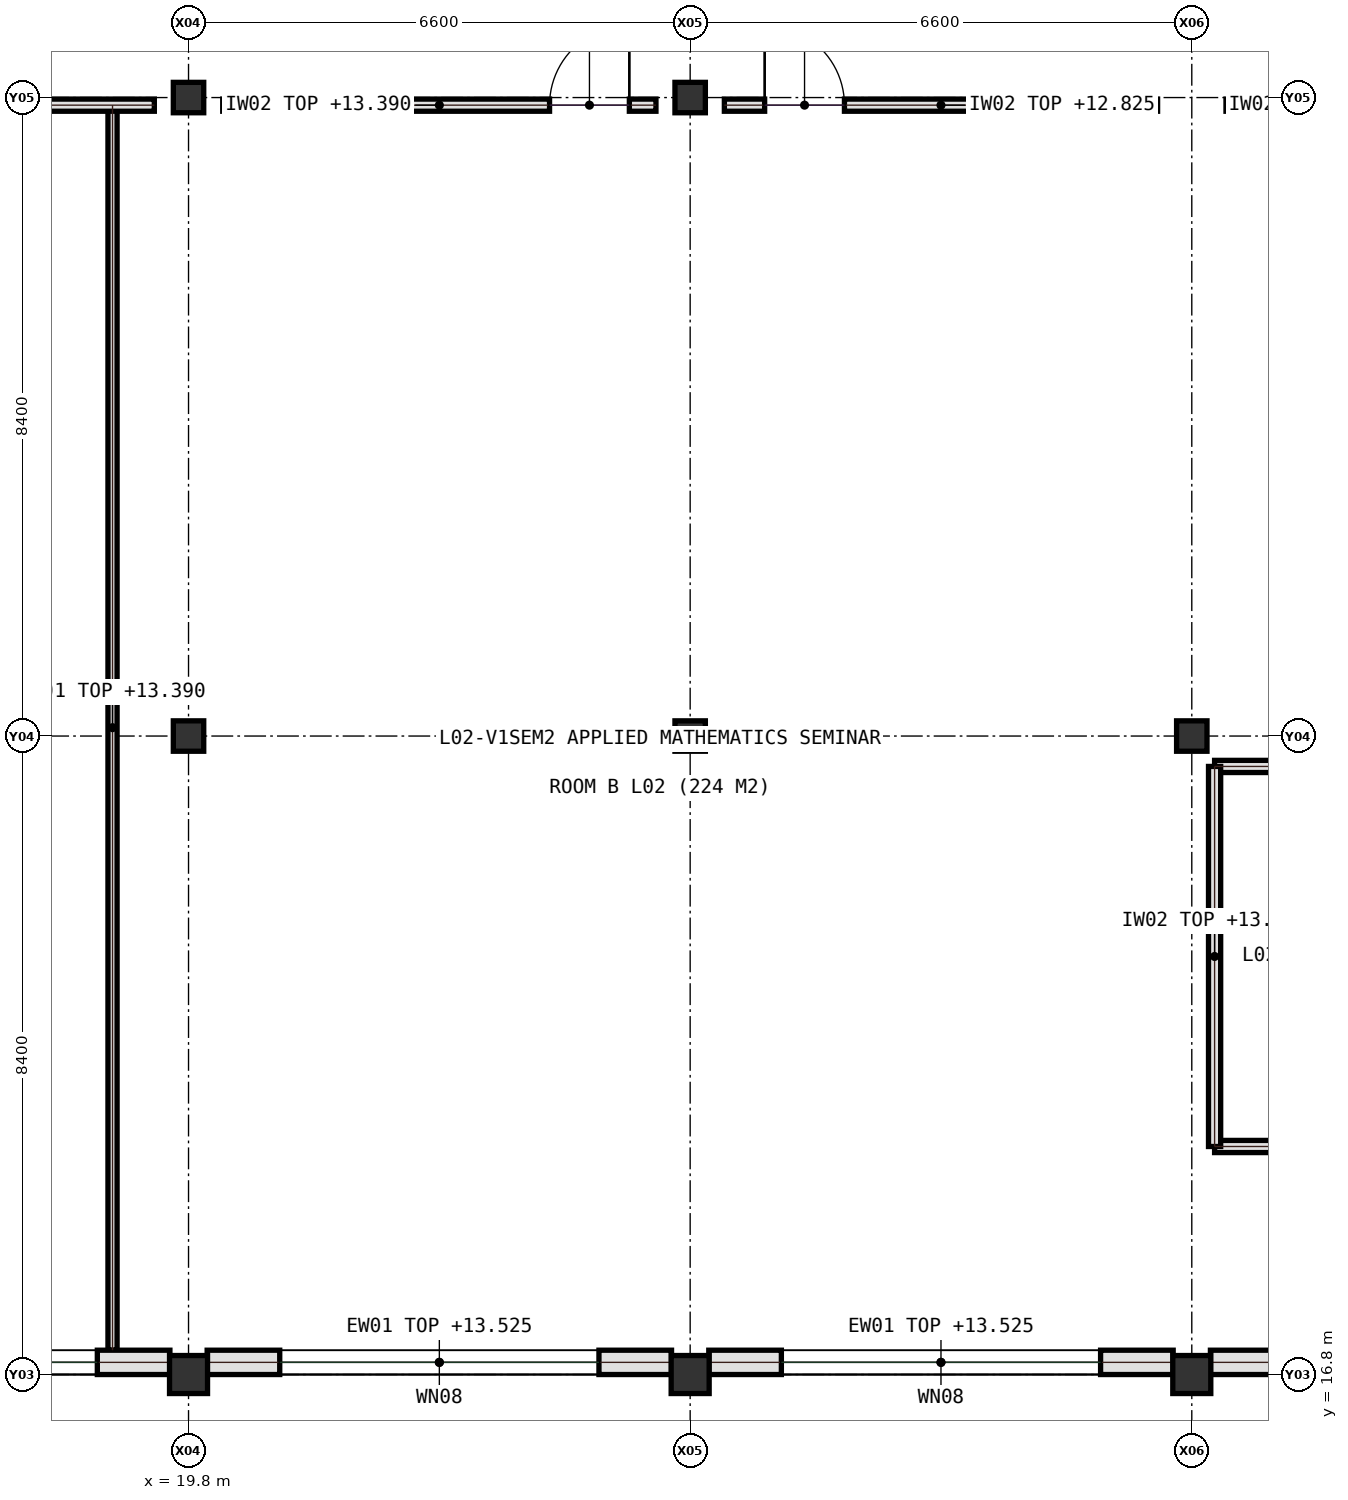
"""IFC4 building model, lengths in metres.
Left out: names, types, materials, properties, quantities, classifications, styles, units other than length and angle.
Written with IfcOpenShell. Run it as: python <this file> out.ifc"""

import sys

from ifc_helpers import new_model, si_unit, direction, frame, frame_2d, origin, origin_2d, place, context, subcontext, project, spatial, rectangle, extrude, element, fill, save


model = new_model("IFC4")
c1 = context("Model", 3, precision=1e-05, world=origin(), true_north=direction((0.0, 1.0)))
c2 = subcontext(c1, "Body", "Model", "MODEL_VIEW")
j1 = project(units=[si_unit("LENGTHUNIT", "METRE"), si_unit("PLANEANGLEUNIT", "RADIAN")], contexts=[c1])
p1 = place(None, origin())
s1 = spatial("IfcSite", under=j1, at=p1, CompositionType="ELEMENT")
p2 = place(p1, origin())
s2 = spatial("IfcBuilding", under=s1, at=p2, CompositionType="ELEMENT")
p3 = place(p2, frame((0.0, 0.0, 9.9)))
s3 = spatial("IfcBuildingStorey", under=s2, at=p3, CompositionType="ELEMENT", Elevation=9.9)
p4 = place(p3, frame((19.8, 16.8, 0.0), z_axis=(0.0, 0.0, 1.0), x_axis=(1.0, 0.0, 0.0)))
e1 = element("IfcColumn", 1, at=p4, inside=s3, PredefinedType="COLUMN", context=c2, shape_type="SweptSolid", body=[
    extrude(rectangle(XDim=0.5, YDim=0.5, at=origin_2d()), origin(), (0.0, 0.0, 1.0), 4.5),
])
for number, where, z_axis, x_axis in (
    (2, (19.8, 25.2, 0.0), (0.0, 0.0, 1.0), (1.0, 0.0, 0.0)),
    (3, (19.8, 33.6, 0.0), (0.0, 0.0, 1.0), (1.0, 0.0, 0.0)),
):
    element("IfcColumn", number, at=place(p3, frame(where, z_axis=z_axis, x_axis=x_axis)), inside=s3, PredefinedType="COLUMN", context=c2, shape_type="SweptSolid", body=[
        extrude(rectangle(XDim=0.4, YDim=0.4, at=origin_2d()), origin(), (0.0, 0.0, 1.0), 4.5),
    ])
p5 = place(p3, frame((26.4, 16.8, 0.0), z_axis=(0.0, 0.0, 1.0), x_axis=(1.0, 0.0, 0.0)))
e4 = element("IfcColumn", 4, at=p5, inside=s3, PredefinedType="COLUMN", context=c2, shape_type="SweptSolid", body=[
    extrude(rectangle(XDim=0.5, YDim=0.5, at=origin_2d()), origin(), (0.0, 0.0, 1.0), 4.5),
])
for number, where, z_axis, x_axis in (
    (5, (26.4, 25.2, 0.0), (0.0, 0.0, 1.0), (1.0, 0.0, 0.0)),
    (6, (26.4, 33.6, 0.0), (0.0, 0.0, 1.0), (1.0, 0.0, 0.0)),
):
    element("IfcColumn", number, at=place(p3, frame(where, z_axis=z_axis, x_axis=x_axis)), inside=s3, PredefinedType="COLUMN", context=c2, shape_type="SweptSolid", body=[
        extrude(rectangle(XDim=0.4, YDim=0.4, at=origin_2d()), origin(), (0.0, 0.0, 1.0), 4.5),
    ])
p6 = place(p3, frame((33.0, 16.8, 0.0), z_axis=(0.0, 0.0, 1.0), x_axis=(1.0, 0.0, 0.0)))
e7 = element("IfcColumn", 7, at=p6, inside=s3, PredefinedType="COLUMN", context=c2, shape_type="SweptSolid", body=[
    extrude(rectangle(XDim=0.5, YDim=0.5, at=origin_2d()), origin(), (0.0, 0.0, 1.0), 4.5),
])
p7 = place(p3, frame((33.0, 25.2, 0.0), z_axis=(0.0, 0.0, 1.0), x_axis=(1.0, 0.0, 0.0)))
e8 = element("IfcColumn", 8, at=p7, inside=s3, PredefinedType="COLUMN", context=c2, shape_type="SweptSolid", body=[
    extrude(rectangle(XDim=0.4, YDim=0.4, at=origin_2d()), origin(), (0.0, 0.0, 1.0), 4.5),
])
p8 = place(p3, frame((33.3, 19.8, 0.0), z_axis=(0.0, 0.0, 1.0), x_axis=(1.0, 0.0, 0.0)))
e9 = element("IfcWall", 9, at=p8, inside=s3, PredefinedType="PARTITIONING", context=c2, shape_type="SweptSolid", body=[
    extrude(rectangle(XDim=12.65, YDim=0.16, at=frame_2d((6.325, 0.0))), origin(), (0.0, 0.0, 1.0), 3.49),
])
p9 = place(p8, frame((2.2, 0.0, 0.0)))
e10 = element("IfcOpeningElement", 10, at=p9, cuts=e9, PredefinedType="OPENING", context=c2, shape_type="SweptSolid", body=[
    extrude(rectangle(XDim=1.05, YDim=2.15, at=frame_2d((0.525, 1.075))), frame((0.0, 0.09, 0.0), z_axis=(0.0, -1.0, 0.0), x_axis=(1.0, 0.0, 0.0)), (0.0, 0.0, 1.0), 0.18),
])
p10 = place(p8, frame((7.0, 0.0, 0.0)))
e11 = element("IfcOpeningElement", 11, at=p10, cuts=e9, PredefinedType="OPENING", context=c2, shape_type="SweptSolid", body=[
    extrude(rectangle(XDim=1.05, YDim=2.15, at=frame_2d((0.525, 1.075))), frame((0.0, 0.09, 0.0), z_axis=(0.0, -1.0, 0.0), x_axis=(1.0, 0.0, 0.0)), (0.0, 0.0, 1.0), 0.18),
])
p11 = place(p8, frame((11.1, 0.0, 0.0)))
e12 = element("IfcOpeningElement", 12, at=p11, cuts=e9, PredefinedType="OPENING", context=c2, shape_type="SweptSolid", body=[
    extrude(rectangle(XDim=1.05, YDim=2.15, at=frame_2d((0.525, 1.075))), frame((0.0, 0.09, 0.0), z_axis=(0.0, -1.0, 0.0), x_axis=(1.0, 0.0, 0.0)), (0.0, 0.0, 1.0), 0.18),
])
p12 = place(p3, frame((33.3, 24.8, 0.0), z_axis=(0.0, 0.0, 1.0), x_axis=(1.0, 0.0, 0.0)))
e13 = element("IfcWall", 13, at=p12, inside=s3, PredefinedType="PARTITIONING", context=c2, shape_type="SweptSolid", body=[
    extrude(rectangle(XDim=5.85, YDim=0.16, at=frame_2d((2.925, 0.0))), origin(), (0.0, 0.0, 1.0), 3.49),
])
p13 = place(p3, frame((33.3, 19.8, 0.0), z_axis=(0.0, 0.0, 1.0), x_axis=(0.0, 1.0, 0.0)))
e14 = element("IfcWall", 14, at=p13, inside=s3, PredefinedType="PARTITIONING", context=c2, shape_type="SweptSolid", body=[
    extrude(rectangle(XDim=5.0, YDim=0.16, at=frame_2d((2.5, 0.0))), origin(), (0.0, 0.0, 1.0), 3.49),
])
p14 = place(p3, frame((18.8, 17.12, 0.0), z_axis=(0.0, 0.0, 1.0), x_axis=(0.0, 1.0, 0.0)))
e15 = element("IfcWall", 15, at=p14, inside=s3, PredefinedType="PARTITIONING", context=c2, shape_type="SweptSolid", body=[
    extrude(rectangle(XDim=16.38, YDim=0.12, at=frame_2d((8.19, 0.0))), origin(), (0.0, 0.0, 1.0), 3.49),
])
p15 = place(p3, frame((13.65, 33.5, 0.0), z_axis=(0.0, 0.0, 1.0), x_axis=(1.0, 0.0, 0.0)))
e16 = element("IfcWall", 16, at=p15, inside=s3, PredefinedType="PARTITIONING", context=c2, shape_type="SweptSolid", body=[
    extrude(rectangle(XDim=5.7, YDim=0.16, at=frame_2d((2.85, 0.0))), origin(), (0.0, 0.0, 1.0), 2.925),
])
p16 = place(p3, frame((20.25, 33.5, 0.0), z_axis=(0.0, 0.0, 1.0), x_axis=(1.0, 0.0, 0.0)))
e17 = element("IfcWall", 17, at=p16, inside=s3, PredefinedType="PARTITIONING", context=c2, shape_type="SweptSolid", body=[
    extrude(rectangle(XDim=5.7, YDim=0.16, at=frame_2d((2.85, 0.0))), origin(), (0.0, 0.0, 1.0), 3.49),
])
p17 = place(p16, frame((4.3, 0.0, 0.0)))
e18 = element("IfcOpeningElement", 18, at=p17, cuts=e17, PredefinedType="OPENING", context=c2, shape_type="SweptSolid", body=[
    extrude(rectangle(XDim=1.05, YDim=2.15, at=frame_2d((0.525, 1.075))), frame((0.0, 0.09, 0.0), z_axis=(0.0, -1.0, 0.0), x_axis=(1.0, 0.0, 0.0)), (0.0, 0.0, 1.0), 0.18),
])
p18 = place(p3, frame((26.85, 33.5, 0.0), z_axis=(0.0, 0.0, 1.0), x_axis=(1.0, 0.0, 0.0)))
e19 = element("IfcWall", 19, at=p18, inside=s3, PredefinedType="PARTITIONING", context=c2, shape_type="SweptSolid", body=[
    extrude(rectangle(XDim=5.7, YDim=0.16, at=frame_2d((2.85, 0.0))), origin(), (0.0, 0.0, 1.0), 2.925),
])
p19 = place(p18, frame((0.53, 0.0, 0.0)))
e20 = element("IfcOpeningElement", 20, at=p19, cuts=e19, PredefinedType="OPENING", context=c2, shape_type="SweptSolid", body=[
    extrude(rectangle(XDim=1.05, YDim=2.15, at=frame_2d((0.525, 1.075))), frame((0.0, 0.09, 0.0), z_axis=(0.0, -1.0, 0.0), x_axis=(1.0, 0.0, 0.0)), (0.0, 0.0, 1.0), 0.18),
])
p20 = place(p3, frame((33.45, 33.5, 0.0), z_axis=(0.0, 0.0, 1.0), x_axis=(1.0, 0.0, 0.0)))
e21 = element("IfcWall", 21, at=p20, inside=s3, PredefinedType="PARTITIONING", context=c2, shape_type="SweptSolid", body=[
    extrude(rectangle(XDim=5.7, YDim=0.16, at=frame_2d((2.85, 0.0))), origin(), (0.0, 0.0, 1.0), 2.925),
])
p21 = place(p20, frame((4.3, 0.0, 0.0)))
e22 = element("IfcOpeningElement", 22, at=p21, cuts=e21, PredefinedType="OPENING", context=c2, shape_type="SweptSolid", body=[
    extrude(rectangle(XDim=1.05, YDim=2.15, at=frame_2d((0.525, 1.075))), frame((0.0, 0.09, 0.0), z_axis=(0.0, -1.0, 0.0), x_axis=(1.0, 0.0, 0.0)), (0.0, 0.0, 1.0), 0.18),
])
p22 = place(p3, frame((13.445, 16.96, 0.0), z_axis=(0.0, 0.0, 1.0), x_axis=(1.0, 0.0, 0.0)))
e23 = element("IfcWall", 23, at=p22, inside=s3, PredefinedType="SOLIDWALL", context=c2, shape_type="SweptSolid", body=[
    extrude(rectangle(XDim=6.11, YDim=0.32, at=frame_2d((3.055, 0.0))), origin(), (0.0, 0.0, 1.0), 3.625),
])
p23 = place(p22, frame((0.955, 0.0, 1.45)))
e24 = element("IfcOpeningElement", 24, at=p23, cuts=e23, PredefinedType="OPENING", context=c2, shape_type="SweptSolid", body=[
    extrude(rectangle(XDim=4.2, YDim=1.1, at=frame_2d((2.1, 0.55))), frame((0.0, 0.17, 0.0), z_axis=(0.0, -1.0, 0.0), x_axis=(1.0, 0.0, 0.0)), (0.0, 0.0, 1.0), 0.34),
])
p24 = place(p3, frame((20.045, 16.96, 0.0), z_axis=(0.0, 0.0, 1.0), x_axis=(1.0, 0.0, 0.0)))
e25 = element("IfcWall", 25, at=p24, inside=s3, PredefinedType="SOLIDWALL", context=c2, shape_type="SweptSolid", body=[
    extrude(rectangle(XDim=6.11, YDim=0.32, at=frame_2d((3.055, 0.0))), origin(), (0.0, 0.0, 1.0), 3.625),
])
p25 = place(p24, frame((0.955, 0.0, 1.45)))
e26 = element("IfcOpeningElement", 26, at=p25, cuts=e25, PredefinedType="OPENING", context=c2, shape_type="SweptSolid", body=[
    extrude(rectangle(XDim=4.2, YDim=1.1, at=frame_2d((2.1, 0.55))), frame((0.0, 0.17, 0.0), z_axis=(0.0, -1.0, 0.0), x_axis=(1.0, 0.0, 0.0)), (0.0, 0.0, 1.0), 0.34),
])
p26 = place(p3, frame((26.645, 16.96, 0.0), z_axis=(0.0, 0.0, 1.0), x_axis=(1.0, 0.0, 0.0)))
e27 = element("IfcWall", 27, at=p26, inside=s3, PredefinedType="SOLIDWALL", context=c2, shape_type="SweptSolid", body=[
    extrude(rectangle(XDim=6.11, YDim=0.32, at=frame_2d((3.055, 0.0))), origin(), (0.0, 0.0, 1.0), 3.625),
])
p27 = place(p26, frame((0.955, 0.0, 1.45)))
e28 = element("IfcOpeningElement", 28, at=p27, cuts=e27, PredefinedType="OPENING", context=c2, shape_type="SweptSolid", body=[
    extrude(rectangle(XDim=4.2, YDim=1.1, at=frame_2d((2.1, 0.55))), frame((0.0, 0.17, 0.0), z_axis=(0.0, -1.0, 0.0), x_axis=(1.0, 0.0, 0.0)), (0.0, 0.0, 1.0), 0.34),
])
p28 = place(p3, frame((33.245, 16.96, 0.0), z_axis=(0.0, 0.0, 1.0), x_axis=(1.0, 0.0, 0.0)))
e29 = element("IfcWall", 29, at=p28, inside=s3, PredefinedType="SOLIDWALL", context=c2, shape_type="SweptSolid", body=[
    extrude(rectangle(XDim=6.11, YDim=0.32, at=frame_2d((3.055, 0.0))), origin(), (0.0, 0.0, 1.0), 3.625),
])
p29 = place(p28, frame((0.955, 0.0, 1.45)))
e30 = element("IfcOpeningElement", 30, at=p29, cuts=e29, PredefinedType="OPENING", context=c2, shape_type="SweptSolid", body=[
    extrude(rectangle(XDim=4.2, YDim=1.1, at=frame_2d((2.1, 0.55))), frame((0.0, 0.17, 0.0), z_axis=(0.0, -1.0, 0.0), x_axis=(1.0, 0.0, 0.0)), (0.0, 0.0, 1.0), 0.34),
])
p30 = place(p17, origin())
e31 = element("IfcDoor", 31, at=p30, inside=s3, OperationType="SINGLE_SWING_RIGHT", PredefinedType="DOOR", context=c2, shape_type="SweptSolid", body=[
    extrude(rectangle(XDim=1.05, YDim=2.15, at=frame_2d((0.525, 1.075))), frame((0.0, 0.025, 0.0), z_axis=(0.0, -1.0, 0.0), x_axis=(1.0, 0.0, 0.0)), (0.0, 0.0, 1.0), 0.05),
])
fill(e18, e31)
p31 = place(p19, origin())
e32 = element("IfcDoor", 32, at=p31, inside=s3, OperationType="SINGLE_SWING_LEFT", PredefinedType="DOOR", context=c2, shape_type="SweptSolid", body=[
    extrude(rectangle(XDim=1.05, YDim=2.15, at=frame_2d((0.525, 1.075))), frame((0.0, 0.025, 0.0), z_axis=(0.0, -1.0, 0.0), x_axis=(1.0, 0.0, 0.0)), (0.0, 0.0, 1.0), 0.05),
])
fill(e20, e32)
p32 = place(p23, origin())
e33 = element("IfcWindow", 33, at=p32, inside=s3, PartitioningType="SINGLE_PANEL", PredefinedType="WINDOW", context=c2, shape_type="SweptSolid", body=[
    extrude(rectangle(XDim=4.2, YDim=1.1, at=frame_2d((2.1, 0.55))), frame((0.0, 0.03, 0.0), z_axis=(0.0, -1.0, 0.0), x_axis=(1.0, 0.0, 0.0)), (0.0, 0.0, 1.0), 0.06),
])
fill(e24, e33)
p33 = place(p25, origin())
e34 = element("IfcWindow", 34, at=p33, inside=s3, PartitioningType="SINGLE_PANEL", PredefinedType="WINDOW", context=c2, shape_type="SweptSolid", body=[
    extrude(rectangle(XDim=4.2, YDim=1.1, at=frame_2d((2.1, 0.55))), frame((0.0, 0.03, 0.0), z_axis=(0.0, -1.0, 0.0), x_axis=(1.0, 0.0, 0.0)), (0.0, 0.0, 1.0), 0.06),
])
fill(e26, e34)
p34 = place(p27, origin())
e35 = element("IfcWindow", 35, at=p34, inside=s3, PartitioningType="SINGLE_PANEL", PredefinedType="WINDOW", context=c2, shape_type="SweptSolid", body=[
    extrude(rectangle(XDim=4.2, YDim=1.1, at=frame_2d((2.1, 0.55))), frame((0.0, 0.03, 0.0), z_axis=(0.0, -1.0, 0.0), x_axis=(1.0, 0.0, 0.0)), (0.0, 0.0, 1.0), 0.06),
])
fill(e28, e35)
save(model, sys.argv[1])
